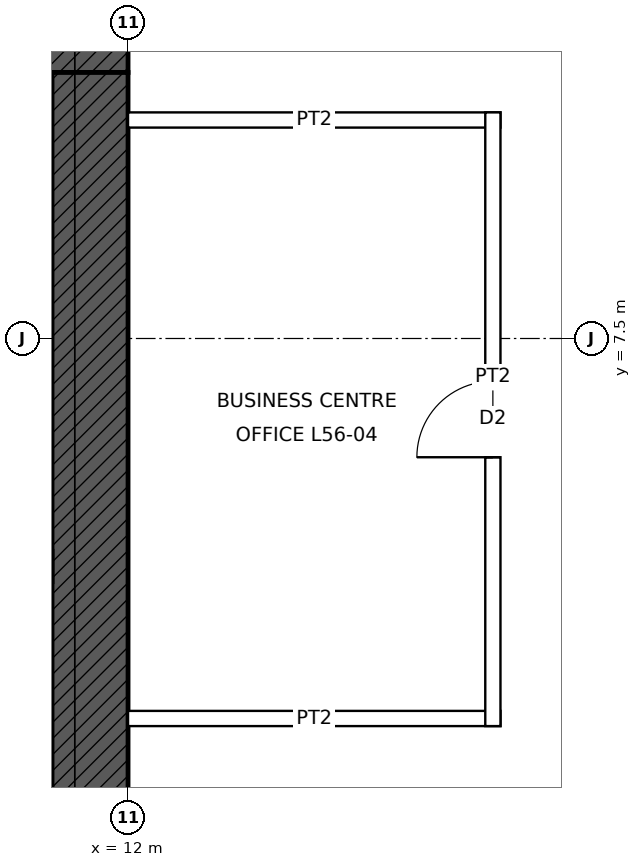
"""IFC4 building model, lengths in metres.
Left out: names, types, materials, properties, quantities, classifications, styles, units other than length and angle.
Written with IfcOpenShell. Run it as: python <this file> out.ifc"""

import sys

from ifc_helpers import new_model, si_unit, direction, frame, frame_2d, origin, place, context, subcontext, project, spatial, rectangle, extrude, element, fill, save


model = new_model("IFC4")
c1 = context("Model", 3, precision=1e-05, world=origin(), true_north=direction((0.0, 1.0)))
c2 = subcontext(c1, "Body", "Model", "MODEL_VIEW")
j1 = project(units=[si_unit("LENGTHUNIT", "METRE"), si_unit("PLANEANGLEUNIT", "RADIAN")], contexts=[c1])
p1 = place(None, origin())
s1 = spatial("IfcSite", under=j1, at=p1, CompositionType="ELEMENT")
p2 = place(p1, origin())
s2 = spatial("IfcBuilding", under=s1, at=p2, CompositionType="ELEMENT")
p3 = place(p2, frame((0.0, 0.0, 259.9)))
s3 = spatial("IfcBuildingStorey", under=s2, at=p3, CompositionType="ELEMENT", Elevation=259.9)
p4 = place(p3, frame((-12.0, 11.5, 0.0), z_axis=(0.0, 0.0, 1.0), x_axis=(1.0, 0.0, 0.0)))
e1 = element("IfcWall", 1, at=p4, inside=s3, PredefinedType="SHEAR", context=c2, shape_type="SweptSolid", body=[
    extrude(rectangle(XDim=24.0, YDim=1.0, at=frame_2d((12.0, 0.0))), origin(), (0.0, 0.0, 1.0), 4.0),
])
p5 = place(p4, frame((6.25, 0.0, 0.0)))
e2 = element("IfcOpeningElement", 2, at=p5, cuts=e1, PredefinedType="OPENING", context=c2, shape_type="SweptSolid", body=[
    extrude(rectangle(XDim=1.0, YDim=2.4, at=frame_2d((0.5, 1.2))), frame((0.0, 0.51, 0.0), z_axis=(0.0, -1.0, 0.0), x_axis=(1.0, 0.0, 0.0)), (0.0, 0.0, 1.0), 1.02),
])
p6 = place(p4, frame((16.75, 0.0, 0.0)))
e3 = element("IfcOpeningElement", 3, at=p6, cuts=e1, PredefinedType="OPENING", context=c2, shape_type="SweptSolid", body=[
    extrude(rectangle(XDim=1.0, YDim=2.4, at=frame_2d((0.5, 1.2))), frame((0.0, 0.51, 0.0), z_axis=(0.0, -1.0, 0.0), x_axis=(1.0, 0.0, 0.0)), (0.0, 0.0, 1.0), 1.02),
])
p7 = place(p3, frame((11.5, 11.0, 0.0), z_axis=(0.0, 0.0, 1.0), x_axis=(0.0, -1.0, 0.0)))
e4 = element("IfcWall", 4, at=p7, inside=s3, PredefinedType="SHEAR", context=c2, shape_type="SweptSolid", body=[
    extrude(rectangle(XDim=22.0, YDim=1.0, at=frame_2d((11.0, 0.0))), origin(), (0.0, 0.0, 1.0), 4.0),
])
p8 = place(p7, frame((10.5, 0.0, 0.0)))
e5 = element("IfcOpeningElement", 5, at=p8, cuts=e4, PredefinedType="OPENING", context=c2, shape_type="SweptSolid", body=[
    extrude(rectangle(XDim=1.0, YDim=2.4, at=frame_2d((0.5, 1.2))), frame((0.0, 0.51, 0.0), z_axis=(0.0, -1.0, 0.0), x_axis=(1.0, 0.0, 0.0)), (0.0, 0.0, 1.0), 1.02),
])
for number, where, z_axis, x_axis in (
    (6, (12.0, 2.5, 0.0), (0.0, 0.0, 1.0), (1.0, 0.0, 0.0)),
    (7, (12.0, 10.375, 0.0), (0.0, 0.0, 1.0), (1.0, 0.0, 0.0)),
):
    element("IfcWall", number, at=place(p3, frame(where, z_axis=z_axis, x_axis=x_axis)), inside=s3, PredefinedType="PARTITIONING", context=c2, shape_type="SweptSolid", body=[
        extrude(rectangle(XDim=4.9, YDim=0.2, at=frame_2d((2.45, 0.0))), origin(), (0.0, 0.0, 1.0), 3.85),
    ])
p9 = place(p3, frame((16.8, 2.4, 0.0), z_axis=(0.0, 0.0, 1.0), x_axis=(0.0, 1.0, 0.0)))
e8 = element("IfcWall", 8, at=p9, inside=s3, PredefinedType="PARTITIONING", context=c2, shape_type="SweptSolid", body=[
    extrude(rectangle(XDim=8.075, YDim=0.2, at=frame_2d((4.038, 0.0))), origin(), (0.0, 0.0, 1.0), 3.85),
])
p10 = place(p9, frame((3.538, 0.0, 0.0)))
e9 = element("IfcOpeningElement", 9, at=p10, cuts=e8, PredefinedType="OPENING", context=c2, shape_type="SweptSolid", body=[
    extrude(rectangle(XDim=1.0, YDim=2.1, at=frame_2d((0.5, 1.05))), frame((0.0, 0.11, 0.0), z_axis=(0.0, -1.0, 0.0), x_axis=(1.0, 0.0, 0.0)), (0.0, 0.0, 1.0), 0.22),
])
p11 = place(p10, origin())
e10 = element("IfcDoor", 10, at=p11, inside=s3, OperationType="SINGLE_SWING_LEFT", PredefinedType="DOOR", context=c2, shape_type="SweptSolid", body=[
    extrude(rectangle(XDim=1.0, YDim=2.1, at=frame_2d((0.5, 1.05))), frame((0.0, 0.025, 0.0), z_axis=(0.0, -1.0, 0.0), x_axis=(1.0, 0.0, 0.0)), (0.0, 0.0, 1.0), 0.05),
])
fill(e9, e10)
save(model, sys.argv[1])
